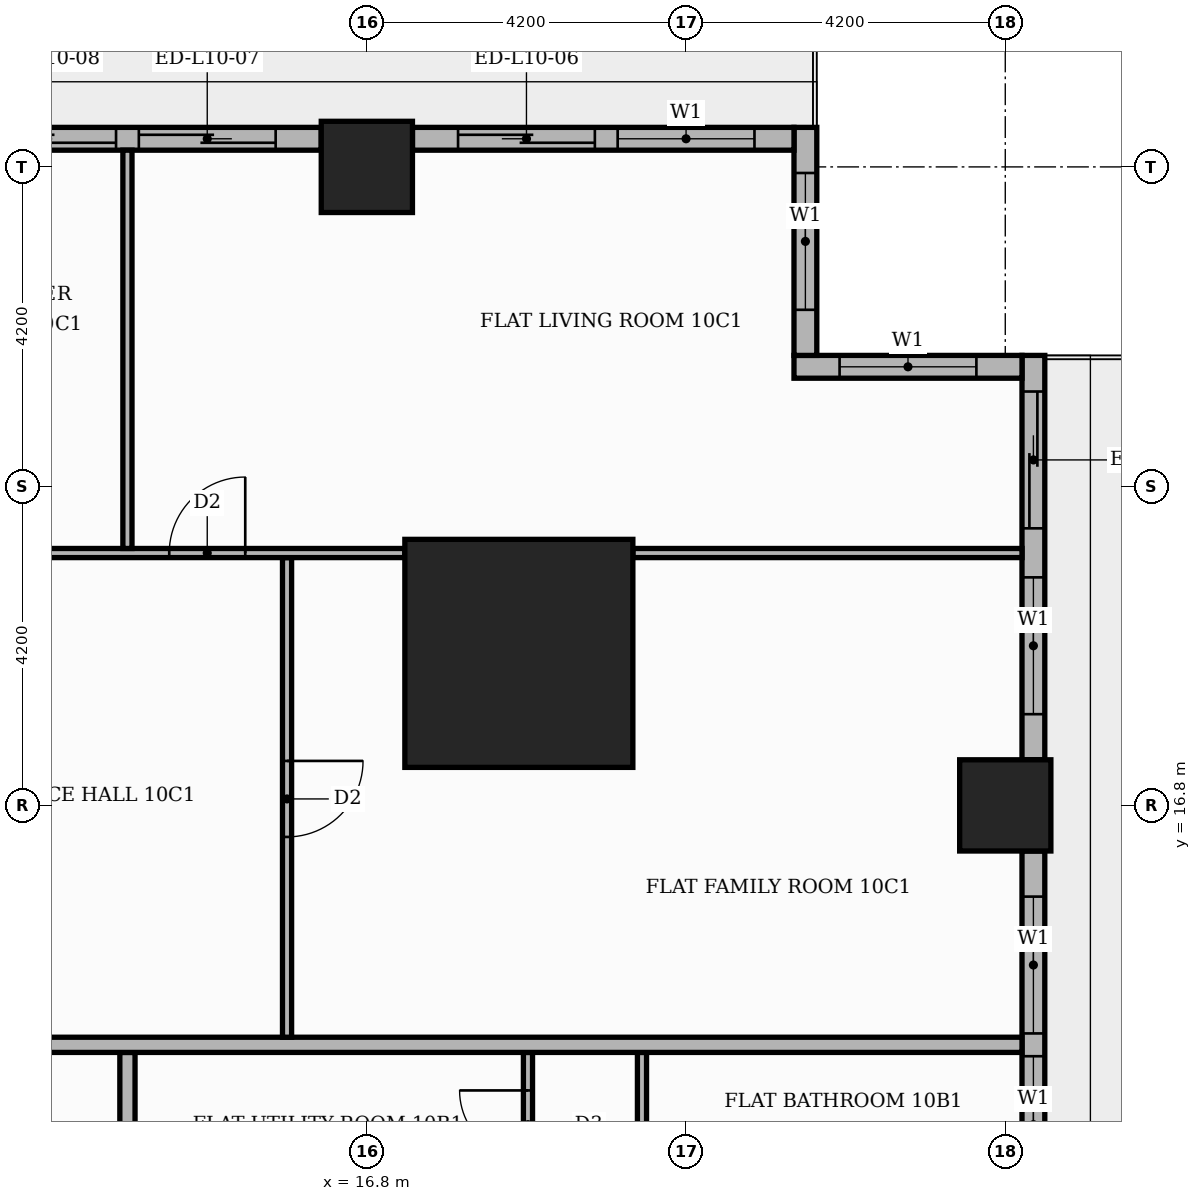
"""IFC4 building model, lengths in metres.
Left out: names, types, materials, properties, quantities, classifications, styles, units other than length and angle.
Written with IfcOpenShell. Run it as: python <this file> out.ifc"""

import sys

from ifc_helpers import new_model, si_unit, direction, frame, frame_2d, origin, origin_2d, place, context, subcontext, project, spatial, rectangle, extrude, element, fill, save


model = new_model("IFC4")
c1 = context("Model", 3, precision=1e-05, world=origin(), true_north=direction((0.0, 1.0)))
c2 = subcontext(c1, "Body", "Model", "MODEL_VIEW")
j1 = project(units=[si_unit("LENGTHUNIT", "METRE"), si_unit("PLANEANGLEUNIT", "RADIAN")], contexts=[c1])
p1 = place(None, origin())
s1 = spatial("IfcSite", under=j1, at=p1, CompositionType="ELEMENT")
p2 = place(p1, origin())
s2 = spatial("IfcBuilding", under=s1, at=p2, CompositionType="ELEMENT")
p3 = place(p2, frame((0.0, 0.0, 46.5)))
s3 = spatial("IfcBuildingStorey", under=s2, at=p3, CompositionType="ELEMENT", Elevation=46.5)
p4 = place(p3, frame((18.8, 18.8, 0.0), z_axis=(0.0, 0.0, 1.0), x_axis=(1.0, 0.0, 0.0)))
e1 = element("IfcColumn", 1, at=p4, inside=s3, PredefinedType="COLUMN", context=c2, shape_type="SweptSolid", body=[
    extrude(rectangle(XDim=3.0, YDim=3.0, at=origin_2d()), origin(), (0.0, 0.0, 1.0), 3.9),
])
for number, where, z_axis, x_axis in (
    (2, (25.2, 16.8, 0.0), (0.0, 0.0, 1.0), (1.0, 0.0, 0.0)),
    (3, (16.8, 25.2, 0.0), (0.0, 0.0, 1.0), (1.0, 0.0, 0.0)),
):
    element("IfcColumn", number, at=place(p3, frame(where, z_axis=z_axis, x_axis=x_axis)), inside=s3, PredefinedType="COLUMN", context=c2, shape_type="SweptSolid", body=[
        extrude(rectangle(XDim=1.2, YDim=1.2, at=origin_2d()), origin(), (0.0, 0.0, 1.0), 3.9),
    ])
p5 = place(p3, frame((25.57, 9.0, 0.0), z_axis=(0.0, 0.0, 1.0), x_axis=(0.0, 1.0, 0.0)))
e4 = element("IfcWall", 4, at=p5, inside=s3, PredefinedType="STANDARD", context=c2, shape_type="SweptSolid", body=[
    extrude(rectangle(XDim=7.2, YDim=0.3, at=frame_2d((3.6, 0.0))), origin(), (0.0, 0.0, 1.0), 3.48),
])
p6 = place(p5, frame((0.6, 0.0, 0.9)))
e5 = element("IfcOpeningElement", 5, at=p6, cuts=e4, PredefinedType="OPENING", context=c2, shape_type="SweptSolid", body=[
    extrude(rectangle(XDim=1.8, YDim=2.1, at=frame_2d((0.9, 1.05))), frame((0.0, 0.16, 0.0), z_axis=(0.0, -1.0, 0.0), x_axis=(1.0, 0.0, 0.0)), (0.0, 0.0, 1.0), 0.32),
])
p7 = place(p5, frame((2.7, 0.0, 0.9)))
e6 = element("IfcOpeningElement", 6, at=p7, cuts=e4, PredefinedType="OPENING", context=c2, shape_type="SweptSolid", body=[
    extrude(rectangle(XDim=1.8, YDim=2.1, at=frame_2d((0.9, 1.05))), frame((0.0, 0.16, 0.0), z_axis=(0.0, -1.0, 0.0), x_axis=(1.0, 0.0, 0.0)), (0.0, 0.0, 1.0), 0.32),
])
p8 = place(p5, frame((4.8, 0.0, 0.9)))
e7 = element("IfcOpeningElement", 7, at=p8, cuts=e4, PredefinedType="OPENING", context=c2, shape_type="SweptSolid", body=[
    extrude(rectangle(XDim=1.8, YDim=2.1, at=frame_2d((0.9, 1.05))), frame((0.0, 0.16, 0.0), z_axis=(0.0, -1.0, 0.0), x_axis=(1.0, 0.0, 0.0)), (0.0, 0.0, 1.0), 0.32),
])
p9 = place(p3, frame((25.57, 17.4, 0.0), z_axis=(0.0, 0.0, 1.0), x_axis=(0.0, 1.0, 0.0)))
e8 = element("IfcWall", 8, at=p9, inside=s3, PredefinedType="STANDARD", context=c2, shape_type="SweptSolid", body=[
    extrude(rectangle(XDim=5.32, YDim=0.3, at=frame_2d((2.66, 0.0))), origin(), (0.0, 0.0, 1.0), 3.48),
])
p10 = place(p9, frame((0.6, 0.0, 0.9)))
e9 = element("IfcOpeningElement", 9, at=p10, cuts=e8, PredefinedType="OPENING", context=c2, shape_type="SweptSolid", body=[
    extrude(rectangle(XDim=1.8, YDim=2.1, at=frame_2d((0.9, 1.05))), frame((0.0, 0.16, 0.0), z_axis=(0.0, -1.0, 0.0), x_axis=(1.0, 0.0, 0.0)), (0.0, 0.0, 1.0), 0.32),
])
p11 = place(p9, frame((3.045, 0.0, 0.0)))
e10 = element("IfcOpeningElement", 10, at=p11, cuts=e8, PredefinedType="OPENING", context=c2, shape_type="SweptSolid", body=[
    extrude(rectangle(XDim=1.8, YDim=2.4, at=frame_2d((0.9, 1.2))), frame((0.0, 0.16, 0.0), z_axis=(0.0, -1.0, 0.0), x_axis=(1.0, 0.0, 0.0)), (0.0, 0.0, 1.0), 0.32),
])
p12 = place(p3, frame((25.42, 22.57, 0.0), z_axis=(0.0, 0.0, 1.0), x_axis=(-1.0, 0.0, 0.0)))
e11 = element("IfcWall", 11, at=p12, inside=s3, PredefinedType="STANDARD", context=c2, shape_type="SweptSolid", body=[
    extrude(rectangle(XDim=3.0, YDim=0.3, at=frame_2d((1.5, 0.0))), origin(), (0.0, 0.0, 1.0), 3.48),
])
p13 = place(p12, frame((0.6, 0.0, 0.9)))
e12 = element("IfcOpeningElement", 12, at=p13, cuts=e11, PredefinedType="OPENING", context=c2, shape_type="SweptSolid", body=[
    extrude(rectangle(XDim=1.8, YDim=2.1, at=frame_2d((0.9, 1.05))), frame((0.0, 0.16, 0.0), z_axis=(0.0, -1.0, 0.0), x_axis=(1.0, 0.0, 0.0)), (0.0, 0.0, 1.0), 0.32),
])
p14 = place(p3, frame((22.57, 22.72, 0.0), z_axis=(0.0, 0.0, 1.0), x_axis=(0.0, 1.0, 0.0)))
e13 = element("IfcWall", 13, at=p14, inside=s3, PredefinedType="STANDARD", context=c2, shape_type="SweptSolid", body=[
    extrude(rectangle(XDim=3.0, YDim=0.3, at=frame_2d((1.5, 0.0))), origin(), (0.0, 0.0, 1.0), 3.48),
])
p15 = place(p14, frame((0.6, 0.0, 0.9)))
e14 = element("IfcOpeningElement", 14, at=p15, cuts=e13, PredefinedType="OPENING", context=c2, shape_type="SweptSolid", body=[
    extrude(rectangle(XDim=1.8, YDim=2.1, at=frame_2d((0.9, 1.05))), frame((0.0, 0.16, 0.0), z_axis=(0.0, -1.0, 0.0), x_axis=(1.0, 0.0, 0.0)), (0.0, 0.0, 1.0), 0.32),
])
p16 = place(p3, frame((22.42, 25.57, 0.0), z_axis=(0.0, 0.0, 1.0), x_axis=(-1.0, 0.0, 0.0)))
e15 = element("IfcWall", 15, at=p16, inside=s3, PredefinedType="STANDARD", context=c2, shape_type="SweptSolid", body=[
    extrude(rectangle(XDim=5.02, YDim=0.3, at=frame_2d((2.51, 0.0))), origin(), (0.0, 0.0, 1.0), 3.48),
])
p17 = place(p16, frame((0.52, 0.0, 0.9)))
e16 = element("IfcOpeningElement", 16, at=p17, cuts=e15, PredefinedType="OPENING", context=c2, shape_type="SweptSolid", body=[
    extrude(rectangle(XDim=1.8, YDim=2.1, at=frame_2d((0.9, 1.05))), frame((0.0, 0.16, 0.0), z_axis=(0.0, -1.0, 0.0), x_axis=(1.0, 0.0, 0.0)), (0.0, 0.0, 1.0), 0.32),
])
p18 = place(p16, frame((2.62, 0.0, 0.0)))
e17 = element("IfcOpeningElement", 17, at=p18, cuts=e15, PredefinedType="OPENING", context=c2, shape_type="SweptSolid", body=[
    extrude(rectangle(XDim=1.8, YDim=2.4, at=frame_2d((0.9, 1.2))), frame((0.0, 0.16, 0.0), z_axis=(0.0, -1.0, 0.0), x_axis=(1.0, 0.0, 0.0)), (0.0, 0.0, 1.0), 0.32),
])
p19 = place(p3, frame((16.2, 25.57, 0.0), z_axis=(0.0, 0.0, 1.0), x_axis=(-1.0, 0.0, 0.0)))
e18 = element("IfcWall", 18, at=p19, inside=s3, PredefinedType="STANDARD", context=c2, shape_type="SweptSolid", body=[
    extrude(rectangle(XDim=7.2, YDim=0.3, at=frame_2d((3.6, 0.0))), origin(), (0.0, 0.0, 1.0), 3.48),
])
p20 = place(p19, frame((0.6, 0.0, 0.0)))
e19 = element("IfcOpeningElement", 19, at=p20, cuts=e18, PredefinedType="OPENING", context=c2, shape_type="SweptSolid", body=[
    extrude(rectangle(XDim=1.8, YDim=2.4, at=frame_2d((0.9, 1.2))), frame((0.0, 0.16, 0.0), z_axis=(0.0, -1.0, 0.0), x_axis=(1.0, 0.0, 0.0)), (0.0, 0.0, 1.0), 0.32),
])
p21 = place(p19, frame((2.7, 0.0, 0.0)))
e20 = element("IfcOpeningElement", 20, at=p21, cuts=e18, PredefinedType="OPENING", context=c2, shape_type="SweptSolid", body=[
    extrude(rectangle(XDim=1.8, YDim=2.4, at=frame_2d((0.9, 1.2))), frame((0.0, 0.16, 0.0), z_axis=(0.0, -1.0, 0.0), x_axis=(1.0, 0.0, 0.0)), (0.0, 0.0, 1.0), 0.32),
])
p22 = place(p19, frame((4.8, 0.0, 0.9)))
e21 = element("IfcOpeningElement", 21, at=p22, cuts=e18, PredefinedType="OPENING", context=c2, shape_type="SweptSolid", body=[
    extrude(rectangle(XDim=1.8, YDim=2.1, at=frame_2d((0.9, 1.05))), frame((0.0, 0.16, 0.0), z_axis=(0.0, -1.0, 0.0), x_axis=(1.0, 0.0, 0.0)), (0.0, 0.0, 1.0), 0.32),
])
p23 = place(p3, frame((13.65, -13.55, 0.0), z_axis=(0.0, 0.0, 1.0), x_axis=(0.0, 1.0, 0.0)))
e22 = element("IfcWall", 22, at=p23, inside=s3, PredefinedType="PARTITIONING", context=c2, shape_type="SweptSolid", body=[
    extrude(rectangle(XDim=27.1, YDim=0.2, at=frame_2d((13.55, 0.0))), origin(), (0.0, 0.0, 1.0), 3.48),
])
p24 = place(p23, frame((2.5, 0.0, 0.0)))
e23 = element("IfcOpeningElement", 23, at=p24, cuts=e22, PredefinedType="OPENING", context=c2, shape_type="SweptSolid", body=[
    extrude(rectangle(XDim=1.1, YDim=2.4, at=frame_2d((0.55, 1.2))), frame((0.0, 0.11, 0.0), z_axis=(0.0, -1.0, 0.0), x_axis=(1.0, 0.0, 0.0)), (0.0, 0.0, 1.0), 0.22),
])
p25 = place(p3, frame((18.92, 11.61, 0.0), z_axis=(0.0, 0.0, 1.0), x_axis=(0.0, 1.0, 0.0)))
e24 = element("IfcWall", 24, at=p25, inside=s3, PredefinedType="PARTITIONING", context=c2, shape_type="SweptSolid", body=[
    extrude(rectangle(XDim=1.94, YDim=0.12, at=frame_2d((0.97, 0.0))), origin(), (0.0, 0.0, 1.0), 3.48),
])
p26 = place(p25, frame((0.54, 0.0, 0.0)))
e25 = element("IfcOpeningElement", 25, at=p26, cuts=e24, PredefinedType="OPENING", context=c2, shape_type="SweptSolid", body=[
    extrude(rectangle(XDim=0.9, YDim=2.1, at=frame_2d((0.45, 1.05))), frame((0.0, 0.07, 0.0), z_axis=(0.0, -1.0, 0.0), x_axis=(1.0, 0.0, 0.0)), (0.0, 0.0, 1.0), 0.14),
])
p27 = place(p3, frame((20.42, 11.61, 0.0), z_axis=(0.0, 0.0, 1.0), x_axis=(0.0, 1.0, 0.0)))
e26 = element("IfcWall", 26, at=p27, inside=s3, PredefinedType="PARTITIONING", context=c2, shape_type="SweptSolid", body=[
    extrude(rectangle(XDim=1.94, YDim=0.12, at=frame_2d((0.97, 0.0))), origin(), (0.0, 0.0, 1.0), 3.48),
])
p28 = place(p3, frame((-13.65, 13.65, 0.0), z_axis=(0.0, 0.0, 1.0), x_axis=(1.0, 0.0, 0.0)))
e27 = element("IfcWall", 27, at=p28, inside=s3, PredefinedType="PARTITIONING", context=c2, shape_type="SweptSolid", body=[
    extrude(rectangle(XDim=39.07, YDim=0.2, at=frame_2d((19.535, 0.0))), origin(), (0.0, 0.0, 1.0), 3.48),
])
p29 = place(p28, frame((24.65, 0.0, 0.0)))
e28 = element("IfcOpeningElement", 28, at=p29, cuts=e27, PredefinedType="OPENING", context=c2, shape_type="SweptSolid", body=[
    extrude(rectangle(XDim=1.1, YDim=2.4, at=frame_2d((0.55, 1.2))), frame((0.0, 0.11, 0.0), z_axis=(0.0, -1.0, 0.0), x_axis=(1.0, 0.0, 0.0)), (0.0, 0.0, 1.0), 0.22),
])
p30 = place(p28, frame((14.15, 0.0, 0.0)))
e29 = element("IfcOpeningElement", 29, at=p30, cuts=e27, PredefinedType="OPENING", context=c2, shape_type="SweptSolid", body=[
    extrude(rectangle(XDim=1.1, YDim=2.4, at=frame_2d((0.55, 1.2))), frame((0.0, 0.11, 0.0), z_axis=(0.0, -1.0, 0.0), x_axis=(1.0, 0.0, 0.0)), (0.0, 0.0, 1.0), 0.22),
])
p31 = place(p3, frame((15.75, 13.75, 0.0), z_axis=(0.0, 0.0, 1.0), x_axis=(0.0, 1.0, 0.0)))
e30 = element("IfcWall", 30, at=p31, inside=s3, PredefinedType="PARTITIONING", context=c2, shape_type="SweptSolid", body=[
    extrude(rectangle(XDim=6.31, YDim=0.12, at=frame_2d((3.155, 0.0))), origin(), (0.0, 0.0, 1.0), 3.48),
])
p32 = place(p31, frame((2.635, 0.0, 0.0)))
e31 = element("IfcOpeningElement", 31, at=p32, cuts=e30, PredefinedType="OPENING", context=c2, shape_type="SweptSolid", body=[
    extrude(rectangle(XDim=1.0, YDim=2.1, at=frame_2d((0.5, 1.05))), frame((0.0, 0.07, 0.0), z_axis=(0.0, -1.0, 0.0), x_axis=(1.0, 0.0, 0.0)), (0.0, 0.0, 1.0), 0.14),
])
p33 = place(p3, frame((5.35, 20.12, 0.0), z_axis=(0.0, 0.0, 1.0), x_axis=(1.0, 0.0, 0.0)))
e32 = element("IfcWall", 32, at=p33, inside=s3, PredefinedType="PARTITIONING", context=c2, shape_type="SweptSolid", body=[
    extrude(rectangle(XDim=11.95, YDim=0.12, at=frame_2d((5.975, 0.0))), origin(), (0.0, 0.0, 1.0), 3.48),
])
p34 = place(p33, frame((8.85, 0.0, 0.0)))
e33 = element("IfcOpeningElement", 33, at=p34, cuts=e32, PredefinedType="OPENING", context=c2, shape_type="SweptSolid", body=[
    extrude(rectangle(XDim=1.0, YDim=2.1, at=frame_2d((0.5, 1.05))), frame((0.0, 0.07, 0.0), z_axis=(0.0, -1.0, 0.0), x_axis=(1.0, 0.0, 0.0)), (0.0, 0.0, 1.0), 0.14),
])
p35 = place(p33, frame((5.75, 0.0, 0.0)))
e34 = element("IfcOpeningElement", 34, at=p35, cuts=e32, PredefinedType="OPENING", context=c2, shape_type="SweptSolid", body=[
    extrude(rectangle(XDim=0.9, YDim=2.1, at=frame_2d((0.45, 1.05))), frame((0.0, 0.07, 0.0), z_axis=(0.0, -1.0, 0.0), x_axis=(1.0, 0.0, 0.0)), (0.0, 0.0, 1.0), 0.14),
])
p36 = place(p3, frame((20.3, 20.12, 0.0), z_axis=(0.0, 0.0, 1.0), x_axis=(1.0, 0.0, 0.0)))
e35 = element("IfcWall", 35, at=p36, inside=s3, PredefinedType="PARTITIONING", context=c2, shape_type="SweptSolid", body=[
    extrude(rectangle(XDim=5.12, YDim=0.12, at=frame_2d((2.56, 0.0))), origin(), (0.0, 0.0, 1.0), 3.48),
])
p37 = place(p3, frame((13.65, 20.18, 0.0), z_axis=(0.0, 0.0, 1.0), x_axis=(0.0, 1.0, 0.0)))
e36 = element("IfcWall", 36, at=p37, inside=s3, PredefinedType="PARTITIONING", context=c2, shape_type="SweptSolid", body=[
    extrude(rectangle(XDim=5.24, YDim=0.12, at=frame_2d((2.62, 0.0))), origin(), (0.0, 0.0, 1.0), 3.48),
])
p38 = place(p7, origin())
e37 = element("IfcWindow", 37, at=p38, inside=s3, PartitioningType="SINGLE_PANEL", PredefinedType="WINDOW", context=c2, shape_type="SweptSolid", body=[
    extrude(rectangle(XDim=1.8, YDim=2.1, at=frame_2d((0.9, 1.05))), frame((0.0, 0.03, 0.0), z_axis=(0.0, -1.0, 0.0), x_axis=(1.0, 0.0, 0.0)), (0.0, 0.0, 1.0), 0.06),
])
fill(e6, e37)
p39 = place(p8, origin())
e38 = element("IfcWindow", 38, at=p39, inside=s3, PartitioningType="SINGLE_PANEL", PredefinedType="WINDOW", context=c2, shape_type="SweptSolid", body=[
    extrude(rectangle(XDim=1.8, YDim=2.1, at=frame_2d((0.9, 1.05))), frame((0.0, 0.03, 0.0), z_axis=(0.0, -1.0, 0.0), x_axis=(1.0, 0.0, 0.0)), (0.0, 0.0, 1.0), 0.06),
])
fill(e7, e38)
p40 = place(p10, origin())
e39 = element("IfcWindow", 39, at=p40, inside=s3, PartitioningType="SINGLE_PANEL", PredefinedType="WINDOW", context=c2, shape_type="SweptSolid", body=[
    extrude(rectangle(XDim=1.8, YDim=2.1, at=frame_2d((0.9, 1.05))), frame((0.0, 0.03, 0.0), z_axis=(0.0, -1.0, 0.0), x_axis=(1.0, 0.0, 0.0)), (0.0, 0.0, 1.0), 0.06),
])
fill(e9, e39)
p41 = place(p11, origin())
e40 = element("IfcDoor", 40, at=p41, inside=s3, OperationType="SLIDING_TO_RIGHT", PredefinedType="DOOR", context=c2, shape_type="SweptSolid", body=[
    extrude(rectangle(XDim=1.8, YDim=2.4, at=frame_2d((0.9, 1.2))), frame((0.0, 0.025, 0.0), z_axis=(0.0, -1.0, 0.0), x_axis=(1.0, 0.0, 0.0)), (0.0, 0.0, 1.0), 0.05),
])
fill(e10, e40)
p42 = place(p13, origin())
e41 = element("IfcWindow", 41, at=p42, inside=s3, PartitioningType="SINGLE_PANEL", PredefinedType="WINDOW", context=c2, shape_type="SweptSolid", body=[
    extrude(rectangle(XDim=1.8, YDim=2.1, at=frame_2d((0.9, 1.05))), frame((0.0, 0.03, 0.0), z_axis=(0.0, -1.0, 0.0), x_axis=(1.0, 0.0, 0.0)), (0.0, 0.0, 1.0), 0.06),
])
fill(e12, e41)
p43 = place(p15, origin())
e42 = element("IfcWindow", 42, at=p43, inside=s3, PartitioningType="SINGLE_PANEL", PredefinedType="WINDOW", context=c2, shape_type="SweptSolid", body=[
    extrude(rectangle(XDim=1.8, YDim=2.1, at=frame_2d((0.9, 1.05))), frame((0.0, 0.03, 0.0), z_axis=(0.0, -1.0, 0.0), x_axis=(1.0, 0.0, 0.0)), (0.0, 0.0, 1.0), 0.06),
])
fill(e14, e42)
p44 = place(p17, origin())
e43 = element("IfcWindow", 43, at=p44, inside=s3, PartitioningType="SINGLE_PANEL", PredefinedType="WINDOW", context=c2, shape_type="SweptSolid", body=[
    extrude(rectangle(XDim=1.8, YDim=2.1, at=frame_2d((0.9, 1.05))), frame((0.0, 0.03, 0.0), z_axis=(0.0, -1.0, 0.0), x_axis=(1.0, 0.0, 0.0)), (0.0, 0.0, 1.0), 0.06),
])
fill(e16, e43)
p45 = place(p18, origin())
e44 = element("IfcDoor", 44, at=p45, inside=s3, OperationType="SLIDING_TO_RIGHT", PredefinedType="DOOR", context=c2, shape_type="SweptSolid", body=[
    extrude(rectangle(XDim=1.8, YDim=2.4, at=frame_2d((0.9, 1.2))), frame((0.0, 0.025, 0.0), z_axis=(0.0, -1.0, 0.0), x_axis=(1.0, 0.0, 0.0)), (0.0, 0.0, 1.0), 0.05),
])
fill(e17, e44)
p46 = place(p20, origin())
e45 = element("IfcDoor", 45, at=p46, inside=s3, OperationType="SLIDING_TO_LEFT", PredefinedType="DOOR", context=c2, shape_type="SweptSolid", body=[
    extrude(rectangle(XDim=1.8, YDim=2.4, at=frame_2d((0.9, 1.2))), frame((0.0, 0.025, 0.0), z_axis=(0.0, -1.0, 0.0), x_axis=(1.0, 0.0, 0.0)), (0.0, 0.0, 1.0), 0.05),
])
fill(e19, e45)
p47 = place(p21, origin())
e46 = element("IfcDoor", 46, at=p47, inside=s3, OperationType="SLIDING_TO_RIGHT", PredefinedType="DOOR", context=c2, shape_type="SweptSolid", body=[
    extrude(rectangle(XDim=1.8, YDim=2.4, at=frame_2d((0.9, 1.2))), frame((0.0, 0.025, 0.0), z_axis=(0.0, -1.0, 0.0), x_axis=(1.0, 0.0, 0.0)), (0.0, 0.0, 1.0), 0.05),
])
fill(e20, e46)
p48 = place(p26, origin())
e47 = element("IfcDoor", 47, at=p48, inside=s3, OperationType="SINGLE_SWING_RIGHT", PredefinedType="DOOR", context=c2, shape_type="SweptSolid", body=[
    extrude(rectangle(XDim=0.9, YDim=2.1, at=frame_2d((0.45, 1.05))), frame((0.0, 0.025, 0.0), z_axis=(0.0, -1.0, 0.0), x_axis=(1.0, 0.0, 0.0)), (0.0, 0.0, 1.0), 0.05),
])
fill(e25, e47)
p49 = place(p32, frame((1.0, 0.0, 0.0), z_axis=(0.0, 0.0, 1.0), x_axis=(-1.0, 0.0, 0.0)))
e48 = element("IfcDoor", 48, at=p49, inside=s3, OperationType="SINGLE_SWING_RIGHT", PredefinedType="DOOR", context=c2, shape_type="SweptSolid", body=[
    extrude(rectangle(XDim=1.0, YDim=2.1, at=frame_2d((0.5, 1.05))), frame((0.0, 0.025, 0.0), z_axis=(0.0, -1.0, 0.0), x_axis=(1.0, 0.0, 0.0)), (0.0, 0.0, 1.0), 0.05),
])
fill(e31, e48)
p50 = place(p34, origin())
e49 = element("IfcDoor", 49, at=p50, inside=s3, OperationType="SINGLE_SWING_RIGHT", PredefinedType="DOOR", context=c2, shape_type="SweptSolid", body=[
    extrude(rectangle(XDim=1.0, YDim=2.1, at=frame_2d((0.5, 1.05))), frame((0.0, 0.025, 0.0), z_axis=(0.0, -1.0, 0.0), x_axis=(1.0, 0.0, 0.0)), (0.0, 0.0, 1.0), 0.05),
])
fill(e33, e49)
save(model, sys.argv[1])
